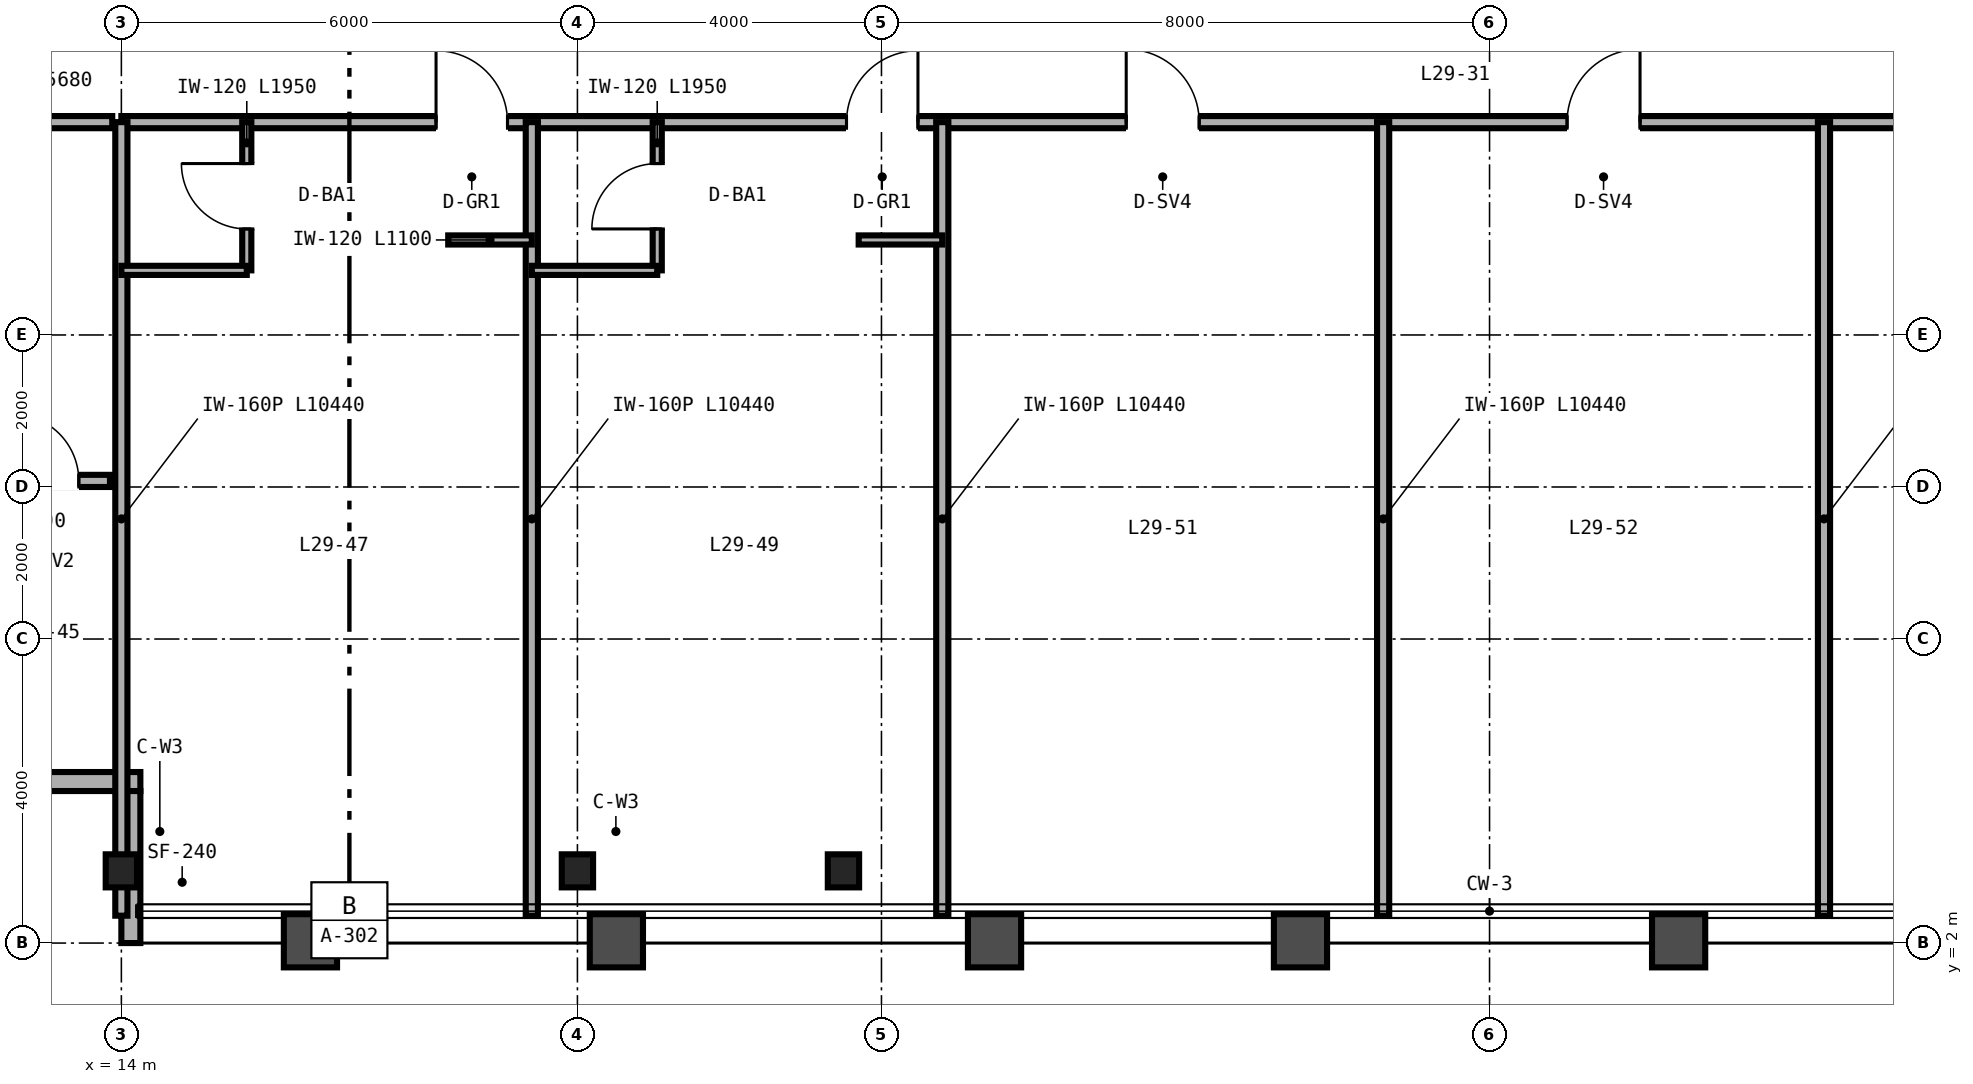
"""IFC4 building model, lengths in metres.
Left out: names, types, materials, properties, quantities, classifications, styles, units other than length and angle.
Written with IfcOpenShell. Run it as: python <this file> out.ifc"""

import sys

from ifc_helpers import new_model, si_unit, direction, frame, frame_2d, origin, origin_2d, place, context, subcontext, project, spatial, rectangle, i_section, extrude, source, transform, mapped, element, fill, save


model = new_model("IFC4")
c1 = context("Model", 3, precision=1e-05, world=origin(), true_north=direction((0.0, 1.0)))
c2 = subcontext(c1, "Body", "Model", "MODEL_VIEW")
j1 = project(units=[si_unit("LENGTHUNIT", "METRE"), si_unit("PLANEANGLEUNIT", "RADIAN")], contexts=[c1])
p1 = place(None, origin())
s1 = spatial("IfcSite", under=j1, at=p1, CompositionType="ELEMENT")
p2 = place(p1, origin())
s2 = spatial("IfcBuilding", under=s1, at=p2, CompositionType="ELEMENT")
p3 = place(p2, frame((0.0, 0.0, 118.8)))
s3 = spatial("IfcBuildingStorey", under=s2, at=p3, CompositionType="ELEMENT", Elevation=118.8)
m1 = source(origin(), c2, "Body", "SweptSolid", [
    extrude(i_section(OverallWidth=0.412, OverallDepth=0.435, WebThickness=0.036, FlangeThickness=0.057, FilletRadius=0.025, at=origin_2d()), origin(), (0.0, 0.0, 1.0), 3.36),
])
for number, where, z_axis, x_axis in (
    (1, (14.0, 2.95, 0.0), (0.0, 0.0, 1.0), (1.0, 0.0, 0.0)),
    (2, (20.0, 2.95, 0.0), (0.0, 0.0, 1.0), (1.0, 0.0, 0.0)),
    (3, (23.5, 2.95, 0.0), (0.0, 0.0, 1.0), (1.0, 0.0, 0.0)),
):
    element("IfcColumn", number, at=place(p3, frame(where, z_axis=z_axis, x_axis=x_axis)), inside=s3, PredefinedType="COLUMN", context=c2, shape_type="MappedRepresentation", body=[
        mapped(m1, transform((0.0, 0.0, 0.0), scale=1.0)),
    ])
p4 = place(p3, frame((12.25, 4.125, 0.0), z_axis=(0.0, 0.0, 1.0), x_axis=(1.0, 0.0, 0.0)))
e4 = element("IfcWall", 4, at=p4, inside=s3, PredefinedType="SOLIDWALL", context=c2, shape_type="SweptSolid", body=[
    extrude(rectangle(XDim=2.0, YDim=0.25, at=frame_2d((1.0, 0.0))), origin(), (0.0, 0.0, 1.0), 3.36),
])
p5 = place(p3, frame((14.125, 4.0, 0.0), z_axis=(0.0, 0.0, 1.0), x_axis=(0.0, -1.0, 0.0)))
e5 = element("IfcWall", 5, at=p5, inside=s3, PredefinedType="SOLIDWALL", context=c2, shape_type="SweptSolid", body=[
    extrude(rectangle(XDim=2.0, YDim=0.25, at=frame_2d((1.0, 0.0))), origin(), (0.0, 0.0, 1.0), 2.667),
])
p6 = place(p3, frame((8.2, 12.8, 0.0), z_axis=(0.0, 0.0, 1.0), x_axis=(1.0, 0.0, 0.0)))
e6 = element("IfcWall", 6, at=p6, inside=s3, PredefinedType="PARTITIONING", context=c2, shape_type="SweptSolid", body=[
    extrude(rectangle(XDim=5.68, YDim=0.16, at=frame_2d((2.84, 0.0))), origin(), (0.0, 0.0, 1.0), 3.36),
])
p7 = place(p6, frame((2.36, 0.0, 0.0)))
e7 = element("IfcOpeningElement", 7, at=p7, cuts=e6, PredefinedType="OPENING", context=c2, shape_type="SweptSolid", body=[
    extrude(rectangle(XDim=0.96, YDim=2.15, at=frame_2d((0.48, 1.075))), frame((0.0, 0.09, 0.0), z_axis=(0.0, -1.0, 0.0), x_axis=(1.0, 0.0, 0.0)), (0.0, 0.0, 1.0), 0.18),
])
p8 = place(p3, frame((12.15, 8.08, 0.0), z_axis=(0.0, 0.0, 1.0), x_axis=(1.0, 0.0, 0.0)))
e8 = element("IfcWall", 8, at=p8, inside=s3, PredefinedType="PARTITIONING", context=c2, shape_type="SweptSolid", body=[
    extrude(rectangle(XDim=1.7, YDim=0.16, at=frame_2d((0.85, 0.0))), origin(), (0.0, 0.0, 1.0), 3.36),
])
p9 = place(p8, frame((0.41, 0.0, 0.0)))
e9 = element("IfcOpeningElement", 9, at=p9, cuts=e8, PredefinedType="OPENING", context=c2, shape_type="SweptSolid", body=[
    extrude(rectangle(XDim=0.88, YDim=2.15, at=frame_2d((0.44, 1.075))), frame((0.0, 0.09, 0.0), z_axis=(0.0, -1.0, 0.0), x_axis=(1.0, 0.0, 0.0)), (0.0, 0.0, 1.0), 0.18),
])
p10 = place(p3, frame((14.0, 12.8, 0.0), z_axis=(0.0, 0.0, 1.0), x_axis=(1.0, 0.0, 0.0)))
e10 = element("IfcWall", 10, at=p10, inside=s3, PredefinedType="PARTITIONING", context=c2, shape_type="SweptSolid", body=[
    extrude(rectangle(XDim=36.0, YDim=0.16, at=frame_2d((18.0, 0.0))), origin(), (0.0, 0.0, 1.0), 2.581),
])
p11 = place(p10, frame((4.14, 0.0, 0.0)))
e11 = element("IfcOpeningElement", 11, at=p11, cuts=e10, PredefinedType="OPENING", context=c2, shape_type="SweptSolid", body=[
    extrude(rectangle(XDim=0.94, YDim=2.15, at=frame_2d((0.47, 1.075))), frame((0.0, 0.09, 0.0), z_axis=(0.0, -1.0, 0.0), x_axis=(1.0, 0.0, 0.0)), (0.0, 0.0, 1.0), 0.18),
])
p12 = place(p10, frame((9.54, 0.0, 0.0)))
e12 = element("IfcOpeningElement", 12, at=p12, cuts=e10, PredefinedType="OPENING", context=c2, shape_type="SweptSolid", body=[
    extrude(rectangle(XDim=0.94, YDim=2.15, at=frame_2d((0.47, 1.075))), frame((0.0, 0.09, 0.0), z_axis=(0.0, -1.0, 0.0), x_axis=(1.0, 0.0, 0.0)), (0.0, 0.0, 1.0), 0.18),
])
p13 = place(p10, frame((13.22, 0.0, 0.0)))
e13 = element("IfcOpeningElement", 13, at=p13, cuts=e10, PredefinedType="OPENING", context=c2, shape_type="SweptSolid", body=[
    extrude(rectangle(XDim=0.96, YDim=2.15, at=frame_2d((0.48, 1.075))), frame((0.0, 0.09, 0.0), z_axis=(0.0, -1.0, 0.0), x_axis=(1.0, 0.0, 0.0)), (0.0, 0.0, 1.0), 0.18),
])
p14 = place(p10, frame((19.02, 0.0, 0.0)))
e14 = element("IfcOpeningElement", 14, at=p14, cuts=e10, PredefinedType="OPENING", context=c2, shape_type="SweptSolid", body=[
    extrude(rectangle(XDim=0.96, YDim=2.15, at=frame_2d((0.48, 1.075))), frame((0.0, 0.09, 0.0), z_axis=(0.0, -1.0, 0.0), x_axis=(1.0, 0.0, 0.0)), (0.0, 0.0, 1.0), 0.18),
])
p15 = place(p10, frame((24.62, 0.0, 0.0)))
e15 = element("IfcOpeningElement", 15, at=p15, cuts=e10, PredefinedType="OPENING", context=c2, shape_type="SweptSolid", body=[
    extrude(rectangle(XDim=0.96, YDim=2.15, at=frame_2d((0.48, 1.075))), frame((0.0, 0.09, 0.0), z_axis=(0.0, -1.0, 0.0), x_axis=(1.0, 0.0, 0.0)), (0.0, 0.0, 1.0), 0.18),
])
p16 = place(p10, frame((30.74, 0.0, 0.0)))
e16 = element("IfcOpeningElement", 16, at=p16, cuts=e10, PredefinedType="OPENING", context=c2, shape_type="SweptSolid", body=[
    extrude(rectangle(XDim=0.94, YDim=2.15, at=frame_2d((0.47, 1.075))), frame((0.0, 0.09, 0.0), z_axis=(0.0, -1.0, 0.0), x_axis=(1.0, 0.0, 0.0)), (0.0, 0.0, 1.0), 0.18),
])
p17 = place(p10, frame((33.52, 0.0, 0.0)))
e17 = element("IfcOpeningElement", 17, at=p17, cuts=e10, PredefinedType="OPENING", context=c2, shape_type="SweptSolid", body=[
    extrude(rectangle(XDim=0.96, YDim=2.15, at=frame_2d((0.48, 1.075))), frame((0.0, 0.09, 0.0), z_axis=(0.0, -1.0, 0.0), x_axis=(1.0, 0.0, 0.0)), (0.0, 0.0, 1.0), 0.18),
])
for number, where, z_axis, x_axis in (
    (18, (14.0, 2.36, 0.0), (0.0, 0.0, 1.0), (0.0, 1.0, 0.0)),
    (19, (19.4, 2.36, 0.0), (0.0, 0.0, 1.0), (0.0, 1.0, 0.0)),
):
    element("IfcWall", number, at=place(p3, frame(where, z_axis=z_axis, x_axis=x_axis)), inside=s3, PredefinedType="PARTITIONING", context=c2, shape_type="SweptSolid", body=[
        extrude(rectangle(XDim=10.44, YDim=0.16, at=frame_2d((5.22, 0.0))), origin(), (0.0, 0.0, 1.0), 2.667),
    ])
p18 = place(p3, frame((15.65, 10.85, 0.0), z_axis=(0.0, 0.0, 1.0), x_axis=(0.0, 1.0, 0.0)))
e20 = element("IfcWall", 20, at=p18, inside=s3, PredefinedType="PARTITIONING", context=c2, shape_type="SweptSolid", body=[
    extrude(rectangle(XDim=1.95, YDim=0.12, at=frame_2d((0.975, 0.0))), origin(), (0.0, 0.0, 1.0), 3.36),
])
p19 = place(p18, frame((0.545, 0.0, 0.0)))
e21 = element("IfcOpeningElement", 21, at=p19, cuts=e20, PredefinedType="OPENING", context=c2, shape_type="SweptSolid", body=[
    extrude(rectangle(XDim=0.86, YDim=2.1, at=frame_2d((0.43, 1.05))), frame((0.0, 0.07, 0.0), z_axis=(0.0, -1.0, 0.0), x_axis=(1.0, 0.0, 0.0)), (0.0, 0.0, 1.0), 0.14),
])
p20 = place(p3, frame((14.0, 10.85, 0.0), z_axis=(0.0, 0.0, 1.0), x_axis=(1.0, 0.0, 0.0)))
e22 = element("IfcWall", 22, at=p20, inside=s3, PredefinedType="PARTITIONING", context=c2, shape_type="SweptSolid", body=[
    extrude(rectangle(XDim=1.65, YDim=0.12, at=frame_2d((0.825, 0.0))), origin(), (0.0, 0.0, 1.0), 3.36),
])
p21 = place(p3, frame((18.3, 11.25, 0.0), z_axis=(0.0, 0.0, 1.0), x_axis=(1.0, 0.0, 0.0)))
e23 = element("IfcWall", 23, at=p21, inside=s3, PredefinedType="PARTITIONING", context=c2, shape_type="SweptSolid", body=[
    extrude(rectangle(XDim=1.1, YDim=0.12, at=frame_2d((0.55, 0.0))), origin(), (0.0, 0.0, 1.0), 3.36),
])
p22 = place(p3, frame((24.8, 2.36, 0.0), z_axis=(0.0, 0.0, 1.0), x_axis=(0.0, 1.0, 0.0)))
e24 = element("IfcWall", 24, at=p22, inside=s3, PredefinedType="PARTITIONING", context=c2, shape_type="SweptSolid", body=[
    extrude(rectangle(XDim=10.44, YDim=0.16, at=frame_2d((5.22, 0.0))), origin(), (0.0, 0.0, 1.0), 2.433),
])
p23 = place(p3, frame((21.05, 10.85, 0.0), z_axis=(0.0, 0.0, 1.0), x_axis=(0.0, 1.0, 0.0)))
e25 = element("IfcWall", 25, at=p23, inside=s3, PredefinedType="PARTITIONING", context=c2, shape_type="SweptSolid", body=[
    extrude(rectangle(XDim=1.95, YDim=0.12, at=frame_2d((0.975, 0.0))), origin(), (0.0, 0.0, 1.0), 3.36),
])
p24 = place(p23, frame((0.545, 0.0, 0.0)))
e26 = element("IfcOpeningElement", 26, at=p24, cuts=e25, PredefinedType="OPENING", context=c2, shape_type="SweptSolid", body=[
    extrude(rectangle(XDim=0.86, YDim=2.1, at=frame_2d((0.43, 1.05))), frame((0.0, 0.07, 0.0), z_axis=(0.0, -1.0, 0.0), x_axis=(1.0, 0.0, 0.0)), (0.0, 0.0, 1.0), 0.14),
])
p25 = place(p3, frame((19.4, 10.85, 0.0), z_axis=(0.0, 0.0, 1.0), x_axis=(1.0, 0.0, 0.0)))
e27 = element("IfcWall", 27, at=p25, inside=s3, PredefinedType="PARTITIONING", context=c2, shape_type="SweptSolid", body=[
    extrude(rectangle(XDim=1.65, YDim=0.12, at=frame_2d((0.825, 0.0))), origin(), (0.0, 0.0, 1.0), 3.36),
])
p26 = place(p3, frame((23.7, 11.25, 0.0), z_axis=(0.0, 0.0, 1.0), x_axis=(1.0, 0.0, 0.0)))
e28 = element("IfcWall", 28, at=p26, inside=s3, PredefinedType="PARTITIONING", context=c2, shape_type="SweptSolid", body=[
    extrude(rectangle(XDim=1.1, YDim=0.12, at=frame_2d((0.55, 0.0))), origin(), (0.0, 0.0, 1.0), 2.581),
])
for number, where, z_axis, x_axis in (
    (29, (30.6, 2.36, 0.0), (0.0, 0.0, 1.0), (0.0, 1.0, 0.0)),
    (30, (36.4, 2.36, 0.0), (0.0, 0.0, 1.0), (0.0, 1.0, 0.0)),
):
    element("IfcWall", number, at=place(p3, frame(where, z_axis=z_axis, x_axis=x_axis)), inside=s3, PredefinedType="PARTITIONING", context=c2, shape_type="SweptSolid", body=[
        extrude(rectangle(XDim=10.44, YDim=0.16, at=frame_2d((5.22, 0.0))), origin(), (0.0, 0.0, 1.0), 2.433),
    ])
m2 = source(origin(), c2, "Body", "SweptSolid", [
    extrude(rectangle(XDim=0.88, YDim=2.15, at=frame_2d((0.44, 1.075))), frame((0.0, 0.025, 0.0), z_axis=(0.0, -1.0, 0.0), x_axis=(1.0, 0.0, 0.0)), (0.0, 0.0, 1.0), 0.05),
])
p27 = place(p9, origin())
e31 = element("IfcDoor", 31, at=p27, inside=s3, OperationType="SINGLE_SWING_LEFT", PredefinedType="DOOR", context=c2, shape_type="MappedRepresentation", body=[
    mapped(m2, transform((0.0, 0.0, 0.0), scale=1.0)),
])
fill(e9, e31)
m3 = source(origin(), c2, "Body", "SweptSolid", [
    extrude(rectangle(XDim=0.86, YDim=2.1, at=frame_2d((0.43, 1.05))), frame((0.0, 0.025, 0.0), z_axis=(0.0, -1.0, 0.0), x_axis=(1.0, 0.0, 0.0)), (0.0, 0.0, 1.0), 0.05),
])
p28 = place(p19, origin())
e32 = element("IfcDoor", 32, at=p28, inside=s3, OperationType="SINGLE_SWING_RIGHT", PredefinedType="DOOR", context=c2, shape_type="MappedRepresentation", body=[
    mapped(m3, transform((0.0, 0.0, 0.0), scale=1.0)),
])
fill(e21, e32)
p29 = place(p24, origin())
e33 = element("IfcDoor", 33, at=p29, inside=s3, OperationType="SINGLE_SWING_LEFT", PredefinedType="DOOR", context=c2, shape_type="MappedRepresentation", body=[
    mapped(m3, transform((0.0, 0.0, 0.0), scale=1.0)),
])
fill(e26, e33)
m4 = source(origin(), c2, "Body", "SweptSolid", [
    extrude(rectangle(XDim=0.94, YDim=2.15, at=frame_2d((0.47, 1.075))), frame((0.0, 0.025, 0.0), z_axis=(0.0, -1.0, 0.0), x_axis=(1.0, 0.0, 0.0)), (0.0, 0.0, 1.0), 0.05),
])
p30 = place(p11, origin())
e34 = element("IfcDoor", 34, at=p30, inside=s3, OperationType="SINGLE_SWING_LEFT", PredefinedType="DOOR", context=c2, shape_type="MappedRepresentation", body=[
    mapped(m4, transform((0.0, 0.0, 0.0), scale=1.0)),
])
fill(e11, e34)
p31 = place(p12, origin())
e35 = element("IfcDoor", 35, at=p31, inside=s3, OperationType="SINGLE_SWING_RIGHT", PredefinedType="DOOR", context=c2, shape_type="MappedRepresentation", body=[
    mapped(m4, transform((0.0, 0.0, 0.0), scale=1.0)),
])
fill(e12, e35)
m5 = source(origin(), c2, "Body", "SweptSolid", [
    extrude(rectangle(XDim=0.96, YDim=2.15, at=frame_2d((0.48, 1.075))), frame((0.0, 0.025, 0.0), z_axis=(0.0, -1.0, 0.0), x_axis=(1.0, 0.0, 0.0)), (0.0, 0.0, 1.0), 0.05),
])
p32 = place(p13, origin())
e36 = element("IfcDoor", 36, at=p32, inside=s3, OperationType="SINGLE_SWING_LEFT", PredefinedType="DOOR", context=c2, shape_type="MappedRepresentation", body=[
    mapped(m5, transform((0.0, 0.0, 0.0), scale=1.0)),
])
fill(e13, e36)
p33 = place(p14, origin())
e37 = element("IfcDoor", 37, at=p33, inside=s3, OperationType="SINGLE_SWING_RIGHT", PredefinedType="DOOR", context=c2, shape_type="MappedRepresentation", body=[
    mapped(m5, transform((0.0, 0.0, 0.0), scale=1.0)),
])
fill(e14, e37)
save(model, sys.argv[1])
